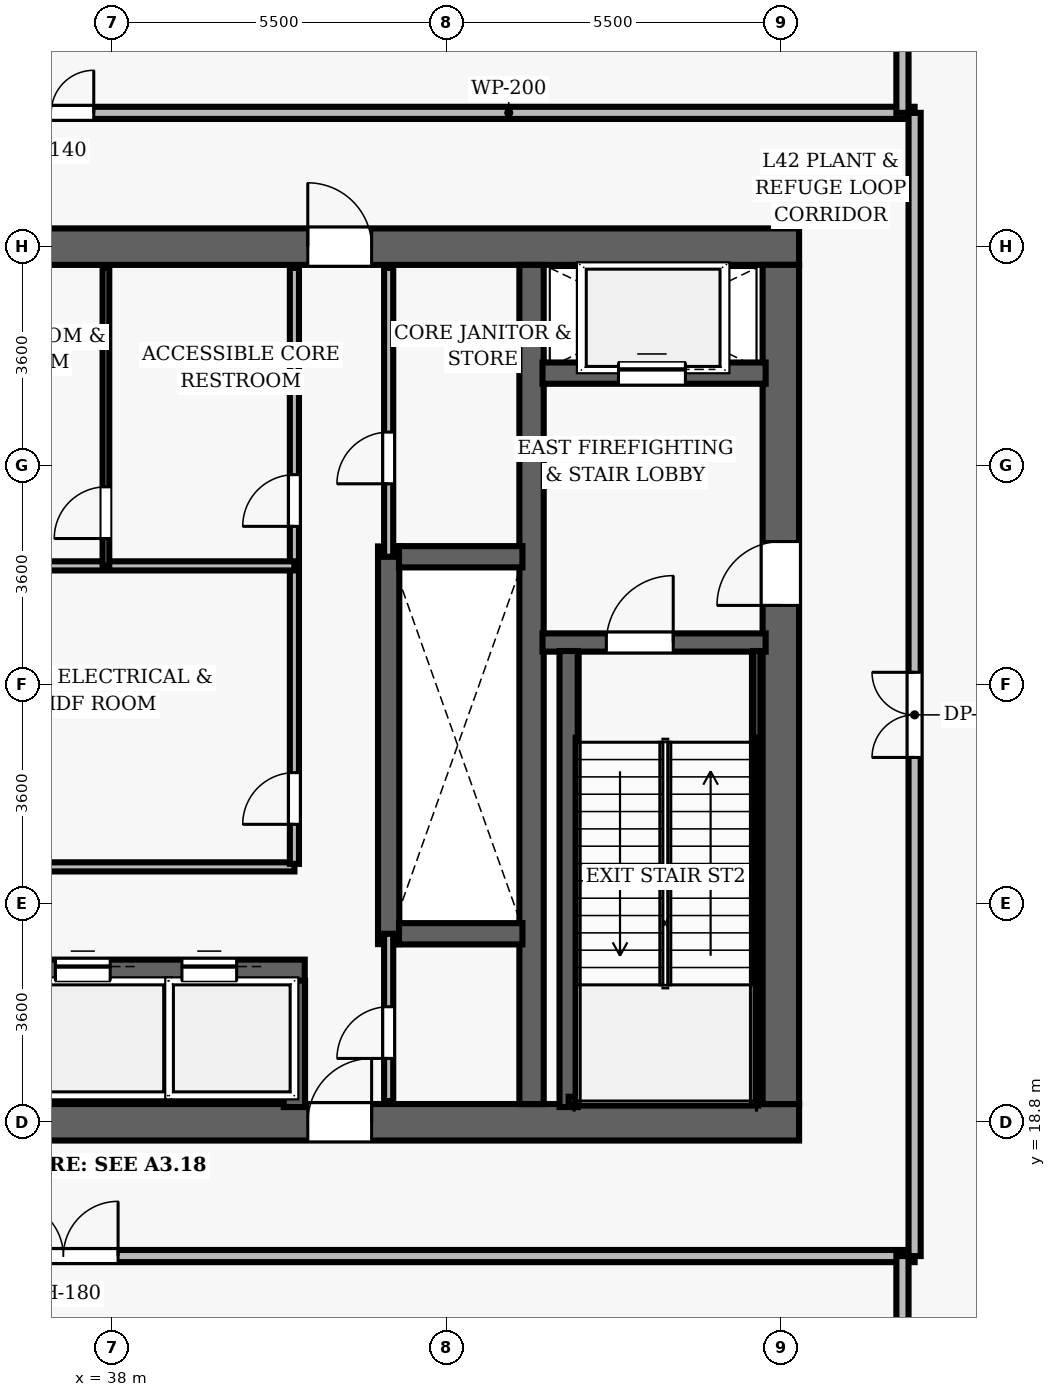
"""IFC4 building model, lengths in metres.
Left out: names, types, materials, properties, quantities, classifications, styles, units other than length and angle.
Written with IfcOpenShell. Run it as: python <this file> out.ifc"""

import sys

from ifc_helpers import new_model, si_unit, direction, frame, frame_2d, origin, place, context, subcontext, project, spatial, rectangle, extrude, element, fill, save


model = new_model("IFC4")
c1 = context("Model", 3, precision=1e-05, world=origin(), true_north=direction((0.0, 1.0)))
c2 = subcontext(c1, "Body", "Model", "MODEL_VIEW")
j1 = project(units=[si_unit("LENGTHUNIT", "METRE"), si_unit("PLANEANGLEUNIT", "RADIAN")], contexts=[c1])
p1 = place(None, origin())
s1 = spatial("IfcSite", under=j1, at=p1, CompositionType="ELEMENT")
p2 = place(p1, origin())
s2 = spatial("IfcBuilding", under=s1, at=p2, CompositionType="ELEMENT")
p3 = place(p2, frame((0.0, 0.0, 165.8)))
s3 = spatial("IfcBuildingStorey", under=s2, at=p3, CompositionType="ELEMENT", Elevation=165.8)
p4 = place(p3, frame((26.7, 18.8, 0.0), z_axis=(0.0, 0.0, 1.0), x_axis=(1.0, 0.0, 0.0)))
e1 = element("IfcWall", 1, at=p4, inside=s3, PredefinedType="SHEAR", context=c2, shape_type="SweptSolid", body=[
    extrude(rectangle(XDim=22.6, YDim=0.6, at=frame_2d((11.3, 0.0))), origin(), (0.0, 0.0, 1.0), 5.4),
])
p5 = place(p4, frame((14.52, 0.0, 0.0)))
e2 = element("IfcOpeningElement", 2, at=p5, cuts=e1, PredefinedType="OPENING", context=c2, shape_type="SweptSolid", body=[
    extrude(rectangle(XDim=1.05, YDim=2.15, at=frame_2d((0.525, 1.075))), frame((0.0, 0.31, 0.0), z_axis=(0.0, -1.0, 0.0), x_axis=(1.0, 0.0, 0.0)), (0.0, 0.0, 1.0), 0.62),
])
p6 = place(p3, frame((26.7, 33.2, 0.0), z_axis=(0.0, 0.0, 1.0), x_axis=(1.0, 0.0, 0.0)))
e3 = element("IfcWall", 3, at=p6, inside=s3, PredefinedType="SHEAR", context=c2, shape_type="SweptSolid", body=[
    extrude(rectangle(XDim=22.6, YDim=0.6, at=frame_2d((11.3, 0.0))), origin(), (0.0, 0.0, 1.0), 5.4),
])
p7 = place(p6, frame((4.62, 0.0, 0.0)))
e4 = element("IfcOpeningElement", 4, at=p7, cuts=e3, PredefinedType="OPENING", context=c2, shape_type="SweptSolid", body=[
    extrude(rectangle(XDim=1.05, YDim=2.15, at=frame_2d((0.525, 1.075))), frame((0.0, 0.31, 0.0), z_axis=(0.0, -1.0, 0.0), x_axis=(1.0, 0.0, 0.0)), (0.0, 0.0, 1.0), 0.62),
])
p8 = place(p6, frame((14.52, 0.0, 0.0)))
e5 = element("IfcOpeningElement", 5, at=p8, cuts=e3, PredefinedType="OPENING", context=c2, shape_type="SweptSolid", body=[
    extrude(rectangle(XDim=1.05, YDim=2.15, at=frame_2d((0.525, 1.075))), frame((0.0, 0.31, 0.0), z_axis=(0.0, -1.0, 0.0), x_axis=(1.0, 0.0, 0.0)), (0.0, 0.0, 1.0), 0.62),
])
p9 = place(p3, frame((49.0, 19.1, 0.0), z_axis=(0.0, 0.0, 1.0), x_axis=(0.0, 1.0, 0.0)))
e6 = element("IfcWall", 6, at=p9, inside=s3, PredefinedType="SHEAR", context=c2, shape_type="SweptSolid", body=[
    extrude(rectangle(XDim=13.8, YDim=0.6, at=frame_2d((6.9, 0.0))), origin(), (0.0, 0.0, 1.0), 5.4),
])
p10 = place(p9, frame((8.2, 0.0, 0.0)))
e7 = element("IfcOpeningElement", 7, at=p10, cuts=e6, PredefinedType="OPENING", context=c2, shape_type="SweptSolid", body=[
    extrude(rectangle(XDim=1.05, YDim=2.15, at=frame_2d((0.525, 1.075))), frame((0.0, 0.31, 0.0), z_axis=(0.0, -1.0, 0.0), x_axis=(1.0, 0.0, 0.0)), (0.0, 0.0, 1.0), 0.62),
])
p11 = place(p3, frame((44.9, 19.1, 0.0), z_axis=(0.0, 0.0, 1.0), x_axis=(0.0, 1.0, 0.0)))
e8 = element("IfcWall", 8, at=p11, inside=s3, PredefinedType="SHEAR", context=c2, shape_type="SweptSolid", body=[
    extrude(rectangle(XDim=13.8, YDim=0.4, at=frame_2d((6.9, 0.0))), origin(), (0.0, 0.0, 1.0), 5.4),
])
p12 = place(p3, frame((45.08, 26.69, 0.0), z_axis=(0.0, 0.0, 1.0), x_axis=(1.0, 0.0, 0.0)))
e9 = element("IfcWall", 9, at=p12, inside=s3, PredefinedType="SHEAR", context=c2, shape_type="SweptSolid", body=[
    extrude(rectangle(XDim=3.67, YDim=0.3, at=frame_2d((1.835, 0.0))), origin(), (0.0, 0.0, 1.0), 5.4),
])
p13 = place(p12, frame((1.05, 0.0, 0.0)))
e10 = element("IfcOpeningElement", 10, at=p13, cuts=e9, PredefinedType="OPENING", context=c2, shape_type="SweptSolid", body=[
    extrude(rectangle(XDim=1.1, YDim=2.15, at=frame_2d((0.55, 1.075))), frame((0.0, 0.16, 0.0), z_axis=(0.0, -1.0, 0.0), x_axis=(1.0, 0.0, 0.0)), (0.0, 0.0, 1.0), 0.32),
])
p14 = place(p3, frame((45.51, 19.05, 0.0), z_axis=(0.0, 0.0, 1.0), x_axis=(0.0, 1.0, 0.0)))
e11 = element("IfcWall", 11, at=p14, inside=s3, PredefinedType="SHEAR", context=c2, shape_type="SweptSolid", body=[
    extrude(rectangle(XDim=7.5, YDim=0.3, at=frame_2d((3.75, 0.0))), origin(), (0.0, 0.0, 1.0), 5.4),
])
p15 = place(p3, frame((48.605, 19.1, 0.0), z_axis=(0.0, 0.0, 1.0), x_axis=(0.0, 1.0, 0.0)))
e12 = element("IfcWall", 12, at=p15, inside=s3, PredefinedType="SHEAR", context=c2, shape_type="SweptSolid", body=[
    extrude(rectangle(XDim=7.45, YDim=0.12, at=frame_2d((3.725, 0.0))), origin(), (0.0, 0.0, 1.0), 5.4),
])
p16 = place(p3, frame((45.51, 19.16, 0.0), z_axis=(0.0, 0.0, 1.0), x_axis=(1.0, 0.0, 0.0)))
e13 = element("IfcWall", 13, at=p16, inside=s3, PredefinedType="SHEAR", context=c2, shape_type="SweptSolid", body=[
    extrude(rectangle(XDim=3.095, YDim=0.12, at=frame_2d((1.547, 0.0))), origin(), (0.0, 0.0, 1.0), 5.4),
])
p17 = place(p3, frame((45.08, 31.12, 0.0), z_axis=(0.0, 0.0, 1.0), x_axis=(1.0, 0.0, 0.0)))
e14 = element("IfcWall", 14, at=p17, inside=s3, PredefinedType="SHEAR", context=c2, shape_type="SweptSolid", body=[
    extrude(rectangle(XDim=3.67, YDim=0.35, at=frame_2d((1.835, 0.0))), origin(), (0.0, 0.0, 1.0), 4.04),
])
p18 = place(p17, frame((1.25, 0.0, 0.0)))
e15 = element("IfcOpeningElement", 15, at=p18, cuts=e14, PredefinedType="OPENING", context=c2, shape_type="SweptSolid", body=[
    extrude(rectangle(XDim=1.1, YDim=2.15, at=frame_2d((0.55, 1.075))), frame((0.0, 0.185, 0.0), z_axis=(0.0, -1.0, 0.0), x_axis=(1.0, 0.0, 0.0)), (0.0, 0.0, 1.0), 0.37),
])
p19 = place(p3, frame((42.55, 21.73, 0.0), z_axis=(0.0, 0.0, 1.0), x_axis=(0.0, 1.0, 0.0)))
e16 = element("IfcWall", 16, at=p19, inside=s3, PredefinedType="SHEAR", context=c2, shape_type="SweptSolid", body=[
    extrude(rectangle(XDim=6.54, YDim=0.35, at=frame_2d((3.27, 0.0))), origin(), (0.0, 0.0, 1.0), 4.04),
])
for number, where, z_axis, x_axis in (
    (17, (42.72, 21.9, 0.0), (0.0, 0.0, 1.0), (1.0, 0.0, 0.0)),
    (18, (42.72, 28.1, 0.0), (0.0, 0.0, 1.0), (1.0, 0.0, 0.0)),
):
    element("IfcWall", number, at=place(p3, frame(where, z_axis=z_axis, x_axis=x_axis)), inside=s3, PredefinedType="SHEAR", context=c2, shape_type="SweptSolid", body=[
        extrude(rectangle(XDim=2.03, YDim=0.35, at=frame_2d((1.015, 0.0))), origin(), (0.0, 0.0, 1.0), 4.04),
    ])
p20 = place(p3, frame((34.49, 21.3, 0.0), z_axis=(0.0, 0.0, 1.0), x_axis=(1.0, 0.0, 0.0)))
e19 = element("IfcWall", 19, at=p20, inside=s3, PredefinedType="SHEAR", context=c2, shape_type="SweptSolid", body=[
    extrude(rectangle(XDim=6.68, YDim=0.35, at=frame_2d((3.34, 0.0))), origin(), (0.0, 0.0, 1.0), 4.04),
])
p21 = place(p20, frame((0.5, 0.0, 0.0)))
e20 = element("IfcOpeningElement", 20, at=p21, cuts=e19, PredefinedType="OPENING", context=c2, shape_type="SweptSolid", body=[
    extrude(rectangle(XDim=0.9, YDim=2.15, at=frame_2d((0.45, 1.075))), frame((0.0, 0.185, 0.0), z_axis=(0.0, -1.0, 0.0), x_axis=(1.0, 0.0, 0.0)), (0.0, 0.0, 1.0), 0.37),
])
p22 = place(p20, frame((2.58, 0.0, 0.0)))
e21 = element("IfcOpeningElement", 21, at=p22, cuts=e19, PredefinedType="OPENING", context=c2, shape_type="SweptSolid", body=[
    extrude(rectangle(XDim=0.9, YDim=2.15, at=frame_2d((0.45, 1.075))), frame((0.0, 0.185, 0.0), z_axis=(0.0, -1.0, 0.0), x_axis=(1.0, 0.0, 0.0)), (0.0, 0.0, 1.0), 0.37),
])
p23 = place(p20, frame((4.66, 0.0, 0.0)))
e22 = element("IfcOpeningElement", 22, at=p23, cuts=e19, PredefinedType="OPENING", context=c2, shape_type="SweptSolid", body=[
    extrude(rectangle(XDim=0.9, YDim=2.15, at=frame_2d((0.45, 1.075))), frame((0.0, 0.185, 0.0), z_axis=(0.0, -1.0, 0.0), x_axis=(1.0, 0.0, 0.0)), (0.0, 0.0, 1.0), 0.37),
])
p24 = place(p3, frame((41.0, 19.05, 0.0), z_axis=(0.0, 0.0, 1.0), x_axis=(0.0, 1.0, 0.0)))
e23 = element("IfcWall", 23, at=p24, inside=s3, PredefinedType="SHEAR", context=c2, shape_type="SweptSolid", body=[
    extrude(rectangle(XDim=2.08, YDim=0.35, at=frame_2d((1.04, 0.0))), origin(), (0.0, 0.0, 1.0), 4.04),
])
p25 = place(p3, frame((34.75, 23.0, 0.0), z_axis=(0.0, 0.0, 1.0), x_axis=(1.0, 0.0, 0.0)))
e24 = element("IfcWall", 24, at=p25, inside=s3, PredefinedType="PARTITIONING", context=c2, shape_type="SweptSolid", body=[
    extrude(rectangle(XDim=6.25, YDim=0.15, at=frame_2d((3.125, 0.0))), origin(), (0.0, 0.0, 1.0), 4.04),
])
p26 = place(p3, frame((41.0, 23.05, 0.0), z_axis=(0.0, 0.0, 1.0), x_axis=(0.0, 1.0, 0.0)))
e25 = element("IfcWall", 25, at=p26, inside=s3, PredefinedType="PARTITIONING", context=c2, shape_type="SweptSolid", body=[
    extrude(rectangle(XDim=9.8, YDim=0.15, at=frame_2d((4.9, 0.0))), origin(), (0.0, 0.0, 1.0), 4.04),
])
p27 = place(p26, frame((0.65, 0.0, 0.0)))
e26 = element("IfcOpeningElement", 26, at=p27, cuts=e25, PredefinedType="OPENING", context=c2, shape_type="SweptSolid", body=[
    extrude(rectangle(XDim=0.85, YDim=2.1, at=frame_2d((0.425, 1.05))), frame((0.0, 0.085, 0.0), z_axis=(0.0, -1.0, 0.0), x_axis=(1.0, 0.0, 0.0)), (0.0, 0.0, 1.0), 0.17),
])
p28 = place(p26, frame((5.55, 0.0, 0.0)))
e27 = element("IfcOpeningElement", 27, at=p28, cuts=e25, PredefinedType="OPENING", context=c2, shape_type="SweptSolid", body=[
    extrude(rectangle(XDim=0.85, YDim=2.1, at=frame_2d((0.425, 1.05))), frame((0.0, 0.085, 0.0), z_axis=(0.0, -1.0, 0.0), x_axis=(1.0, 0.0, 0.0)), (0.0, 0.0, 1.0), 0.17),
])
p29 = place(p3, frame((34.75, 27.95, 0.0), z_axis=(0.0, 0.0, 1.0), x_axis=(1.0, 0.0, 0.0)))
e28 = element("IfcWall", 28, at=p29, inside=s3, PredefinedType="PARTITIONING", context=c2, shape_type="SweptSolid", body=[
    extrude(rectangle(XDim=6.25, YDim=0.15, at=frame_2d((3.125, 0.0))), origin(), (0.0, 0.0, 1.0), 4.04),
])
p30 = place(p3, frame((37.9, 27.95, 0.0), z_axis=(0.0, 0.0, 1.0), x_axis=(0.0, 1.0, 0.0)))
e29 = element("IfcWall", 29, at=p30, inside=s3, PredefinedType="PARTITIONING", context=c2, shape_type="SweptSolid", body=[
    extrude(rectangle(XDim=4.9, YDim=0.11, at=frame_2d((2.45, 0.0))), origin(), (0.0, 0.0, 1.0), 4.04),
])
p31 = place(p30, frame((0.45, 0.0, 0.0)))
e30 = element("IfcOpeningElement", 30, at=p31, cuts=e29, PredefinedType="OPENING", context=c2, shape_type="SweptSolid", body=[
    extrude(rectangle(XDim=0.85, YDim=2.1, at=frame_2d((0.425, 1.05))), frame((0.0, 0.065, 0.0), z_axis=(0.0, -1.0, 0.0), x_axis=(1.0, 0.0, 0.0)), (0.0, 0.0, 1.0), 0.13),
])
p32 = place(p3, frame((42.55, 28.1, 0.0), z_axis=(0.0, 0.0, 1.0), x_axis=(0.0, 1.0, 0.0)))
e31 = element("IfcWall", 31, at=p32, inside=s3, PredefinedType="PARTITIONING", context=c2, shape_type="SweptSolid", body=[
    extrude(rectangle(XDim=4.75, YDim=0.15, at=frame_2d((2.375, 0.0))), origin(), (0.0, 0.0, 1.0), 4.04),
])
p33 = place(p32, frame((1.2, 0.0, 0.0)))
e32 = element("IfcOpeningElement", 32, at=p33, cuts=e31, PredefinedType="OPENING", context=c2, shape_type="SweptSolid", body=[
    extrude(rectangle(XDim=0.85, YDim=2.1, at=frame_2d((0.425, 1.05))), frame((0.0, 0.085, 0.0), z_axis=(0.0, -1.0, 0.0), x_axis=(1.0, 0.0, 0.0)), (0.0, 0.0, 1.0), 0.17),
])
p34 = place(p3, frame((42.55, 19.15, 0.0), z_axis=(0.0, 0.0, 1.0), x_axis=(0.0, 1.0, 0.0)))
e33 = element("IfcWall", 33, at=p34, inside=s3, PredefinedType="PARTITIONING", context=c2, shape_type="SweptSolid", body=[
    extrude(rectangle(XDim=2.75, YDim=0.15, at=frame_2d((1.375, 0.0))), origin(), (0.0, 0.0, 1.0), 4.04),
])
p35 = place(p34, frame((0.7, 0.0, 0.0)))
e34 = element("IfcOpeningElement", 34, at=p35, cuts=e33, PredefinedType="OPENING", context=c2, shape_type="SweptSolid", body=[
    extrude(rectangle(XDim=0.85, YDim=2.1, at=frame_2d((0.425, 1.05))), frame((0.0, 0.085, 0.0), z_axis=(0.0, -1.0, 0.0), x_axis=(1.0, 0.0, 0.0)), (0.0, 0.0, 1.0), 0.17),
])
p36 = place(p3, frame((24.8, 35.4, 0.0), z_axis=(0.0, 0.0, 1.0), x_axis=(1.0, 0.0, 0.0)))
e35 = element("IfcWall", 35, at=p36, inside=s3, PredefinedType="PARTITIONING", context=c2, shape_type="SweptSolid", body=[
    extrude(rectangle(XDim=26.4, YDim=0.2, at=frame_2d((13.2, 0.0))), origin(), (0.0, 0.0, 1.0), 4.04),
])
p37 = place(p36, frame((11.5, 0.0, 0.0)))
e36 = element("IfcOpeningElement", 36, at=p37, cuts=e35, PredefinedType="OPENING", context=c2, shape_type="SweptSolid", body=[
    extrude(rectangle(XDim=1.4, YDim=2.25, at=frame_2d((0.7, 1.125))), frame((0.0, 0.11, 0.0), z_axis=(0.0, -1.0, 0.0), x_axis=(1.0, 0.0, 0.0)), (0.0, 0.0, 1.0), 0.22),
])
p38 = place(p3, frame((24.8, 16.6, 0.0), z_axis=(0.0, 0.0, 1.0), x_axis=(1.0, 0.0, 0.0)))
e37 = element("IfcWall", 37, at=p38, inside=s3, PredefinedType="PARTITIONING", context=c2, shape_type="SweptSolid", body=[
    extrude(rectangle(XDim=26.4, YDim=0.2, at=frame_2d((13.2, 0.0))), origin(), (0.0, 0.0, 1.0), 4.04),
])
p39 = place(p38, frame((11.5, 0.0, 0.0)))
e38 = element("IfcOpeningElement", 38, at=p39, cuts=e37, PredefinedType="OPENING", context=c2, shape_type="SweptSolid", body=[
    extrude(rectangle(XDim=1.8, YDim=2.35, at=frame_2d((0.9, 1.175))), frame((0.0, 0.11, 0.0), z_axis=(0.0, -1.0, 0.0), x_axis=(1.0, 0.0, 0.0)), (0.0, 0.0, 1.0), 0.22),
])
p40 = place(p3, frame((51.2, 16.6, 0.0), z_axis=(0.0, 0.0, 1.0), x_axis=(0.0, 1.0, 0.0)))
e39 = element("IfcWall", 39, at=p40, inside=s3, PredefinedType="PARTITIONING", context=c2, shape_type="SweptSolid", body=[
    extrude(rectangle(XDim=18.8, YDim=0.2, at=frame_2d((9.4, 0.0))), origin(), (0.0, 0.0, 1.0), 4.04),
])
p41 = place(p40, frame((8.2, 0.0, 0.0)))
e40 = element("IfcOpeningElement", 40, at=p41, cuts=e39, PredefinedType="OPENING", context=c2, shape_type="SweptSolid", body=[
    extrude(rectangle(XDim=1.4, YDim=2.25, at=frame_2d((0.7, 1.125))), frame((0.0, 0.11, 0.0), z_axis=(0.0, -1.0, 0.0), x_axis=(1.0, 0.0, 0.0)), (0.0, 0.0, 1.0), 0.22),
])
p42 = place(p3, frame((51.0, 4.455, 0.0), z_axis=(0.0, 0.0, 1.0), x_axis=(0.0, 1.0, 0.0)))
e41 = element("IfcWall", 41, at=p42, inside=s3, PredefinedType="PARTITIONING", context=c2, shape_type="SweptSolid", body=[
    extrude(rectangle(XDim=12.146, YDim=0.2, at=frame_2d((6.073, 0.0))), origin(), (0.0, 0.0, 1.0), 4.04),
])
p43 = place(p3, frame((51.0, 35.4, 0.0), z_axis=(0.0, 0.0, 1.0), x_axis=(0.0, 1.0, 0.0)))
e42 = element("IfcWall", 42, at=p43, inside=s3, PredefinedType="PARTITIONING", context=c2, shape_type="SweptSolid", body=[
    extrude(rectangle(XDim=7.97, YDim=0.2, at=frame_2d((3.985, 0.0))), origin(), (0.0, 0.0, 1.0), 4.04),
])
p44 = place(p13, origin())
e43 = element("IfcDoor", 43, at=p44, inside=s3, OperationType="SINGLE_SWING_RIGHT", PredefinedType="DOOR", context=c2, shape_type="SweptSolid", body=[
    extrude(rectangle(XDim=1.1, YDim=2.15, at=frame_2d((0.55, 1.075))), frame((0.0, 0.025, 0.0), z_axis=(0.0, -1.0, 0.0), x_axis=(1.0, 0.0, 0.0)), (0.0, 0.0, 1.0), 0.05),
])
fill(e10, e43)
p45 = place(p10, origin())
e44 = element("IfcDoor", 44, at=p45, inside=s3, OperationType="SINGLE_SWING_LEFT", PredefinedType="DOOR", context=c2, shape_type="SweptSolid", body=[
    extrude(rectangle(XDim=1.05, YDim=2.15, at=frame_2d((0.525, 1.075))), frame((0.0, 0.025, 0.0), z_axis=(0.0, -1.0, 0.0), x_axis=(1.0, 0.0, 0.0)), (0.0, 0.0, 1.0), 0.05),
])
fill(e7, e44)
p46 = place(p8, origin())
e45 = element("IfcDoor", 45, at=p46, inside=s3, OperationType="SINGLE_SWING_LEFT", PredefinedType="DOOR", context=c2, shape_type="SweptSolid", body=[
    extrude(rectangle(XDim=1.05, YDim=2.15, at=frame_2d((0.525, 1.075))), frame((0.0, 0.025, 0.0), z_axis=(0.0, -1.0, 0.0), x_axis=(1.0, 0.0, 0.0)), (0.0, 0.0, 1.0), 0.05),
])
fill(e5, e45)
p47 = place(p5, origin())
e46 = element("IfcDoor", 46, at=p47, inside=s3, OperationType="SINGLE_SWING_RIGHT", PredefinedType="DOOR", context=c2, shape_type="SweptSolid", body=[
    extrude(rectangle(XDim=1.05, YDim=2.15, at=frame_2d((0.525, 1.075))), frame((0.0, 0.025, 0.0), z_axis=(0.0, -1.0, 0.0), x_axis=(1.0, 0.0, 0.0)), (0.0, 0.0, 1.0), 0.05),
])
fill(e2, e46)
p48 = place(p27, origin())
e47 = element("IfcDoor", 47, at=p48, inside=s3, OperationType="SINGLE_SWING_LEFT", PredefinedType="DOOR", context=c2, shape_type="SweptSolid", body=[
    extrude(rectangle(XDim=0.85, YDim=2.1, at=frame_2d((0.425, 1.05))), frame((0.0, 0.025, 0.0), z_axis=(0.0, -1.0, 0.0), x_axis=(1.0, 0.0, 0.0)), (0.0, 0.0, 1.0), 0.05),
])
fill(e26, e47)
p49 = place(p28, origin())
e48 = element("IfcDoor", 48, at=p49, inside=s3, OperationType="SINGLE_SWING_LEFT", PredefinedType="DOOR", context=c2, shape_type="SweptSolid", body=[
    extrude(rectangle(XDim=0.85, YDim=2.1, at=frame_2d((0.425, 1.05))), frame((0.0, 0.025, 0.0), z_axis=(0.0, -1.0, 0.0), x_axis=(1.0, 0.0, 0.0)), (0.0, 0.0, 1.0), 0.05),
])
fill(e27, e48)
p50 = place(p31, origin())
e49 = element("IfcDoor", 49, at=p50, inside=s3, OperationType="SINGLE_SWING_LEFT", PredefinedType="DOOR", context=c2, shape_type="SweptSolid", body=[
    extrude(rectangle(XDim=0.85, YDim=2.1, at=frame_2d((0.425, 1.05))), frame((0.0, 0.025, 0.0), z_axis=(0.0, -1.0, 0.0), x_axis=(1.0, 0.0, 0.0)), (0.0, 0.0, 1.0), 0.05),
])
fill(e30, e49)
p51 = place(p33, origin())
e50 = element("IfcDoor", 50, at=p51, inside=s3, OperationType="SINGLE_SWING_LEFT", PredefinedType="DOOR", context=c2, shape_type="SweptSolid", body=[
    extrude(rectangle(XDim=0.85, YDim=2.1, at=frame_2d((0.425, 1.05))), frame((0.0, 0.025, 0.0), z_axis=(0.0, -1.0, 0.0), x_axis=(1.0, 0.0, 0.0)), (0.0, 0.0, 1.0), 0.05),
])
fill(e32, e50)
p52 = place(p35, origin())
e51 = element("IfcDoor", 51, at=p52, inside=s3, OperationType="SINGLE_SWING_LEFT", PredefinedType="DOOR", context=c2, shape_type="SweptSolid", body=[
    extrude(rectangle(XDim=0.85, YDim=2.1, at=frame_2d((0.425, 1.05))), frame((0.0, 0.025, 0.0), z_axis=(0.0, -1.0, 0.0), x_axis=(1.0, 0.0, 0.0)), (0.0, 0.0, 1.0), 0.05),
])
fill(e34, e51)
p53 = place(p39, origin())
e52 = element("IfcDoor", 52, at=p53, inside=s3, OperationType="DOUBLE_DOOR_SINGLE_SWING", PredefinedType="DOOR", context=c2, shape_type="SweptSolid", body=[
    extrude(rectangle(XDim=1.8, YDim=2.35, at=frame_2d((0.9, 1.175))), frame((0.0, 0.025, 0.0), z_axis=(0.0, -1.0, 0.0), x_axis=(1.0, 0.0, 0.0)), (0.0, 0.0, 1.0), 0.05),
])
fill(e38, e52)
p54 = place(p37, origin())
e53 = element("IfcDoor", 53, at=p54, inside=s3, OperationType="DOUBLE_DOOR_SINGLE_SWING", PredefinedType="DOOR", context=c2, shape_type="SweptSolid", body=[
    extrude(rectangle(XDim=1.4, YDim=2.25, at=frame_2d((0.7, 1.125))), frame((0.0, 0.025, 0.0), z_axis=(0.0, -1.0, 0.0), x_axis=(1.0, 0.0, 0.0)), (0.0, 0.0, 1.0), 0.05),
])
fill(e36, e53)
p55 = place(p41, origin())
e54 = element("IfcDoor", 54, at=p55, inside=s3, OperationType="DOUBLE_DOOR_SINGLE_SWING", PredefinedType="DOOR", context=c2, shape_type="SweptSolid", body=[
    extrude(rectangle(XDim=1.4, YDim=2.25, at=frame_2d((0.7, 1.125))), frame((0.0, 0.025, 0.0), z_axis=(0.0, -1.0, 0.0), x_axis=(1.0, 0.0, 0.0)), (0.0, 0.0, 1.0), 0.05),
])
fill(e40, e54)
p56 = place(p22, origin())
e55 = element("IfcDoor", 55, at=p56, inside=s3, OperationType="SLIDING_TO_LEFT", PredefinedType="DOOR", context=c2, shape_type="SweptSolid", body=[
    extrude(rectangle(XDim=0.9, YDim=2.15, at=frame_2d((0.45, 1.075))), frame((0.0, 0.025, 0.0), z_axis=(0.0, -1.0, 0.0), x_axis=(1.0, 0.0, 0.0)), (0.0, 0.0, 1.0), 0.05),
])
fill(e21, e55)
p57 = place(p23, origin())
e56 = element("IfcDoor", 56, at=p57, inside=s3, OperationType="SLIDING_TO_LEFT", PredefinedType="DOOR", context=c2, shape_type="SweptSolid", body=[
    extrude(rectangle(XDim=0.9, YDim=2.15, at=frame_2d((0.45, 1.075))), frame((0.0, 0.025, 0.0), z_axis=(0.0, -1.0, 0.0), x_axis=(1.0, 0.0, 0.0)), (0.0, 0.0, 1.0), 0.05),
])
fill(e22, e56)
p58 = place(p18, origin())
e57 = element("IfcDoor", 57, at=p58, inside=s3, OperationType="SLIDING_TO_LEFT", PredefinedType="DOOR", context=c2, shape_type="SweptSolid", body=[
    extrude(rectangle(XDim=1.1, YDim=2.15, at=frame_2d((0.55, 1.075))), frame((0.0, 0.025, 0.0), z_axis=(0.0, -1.0, 0.0), x_axis=(1.0, 0.0, 0.0)), (0.0, 0.0, 1.0), 0.05),
])
fill(e15, e57)
save(model, sys.argv[1])
